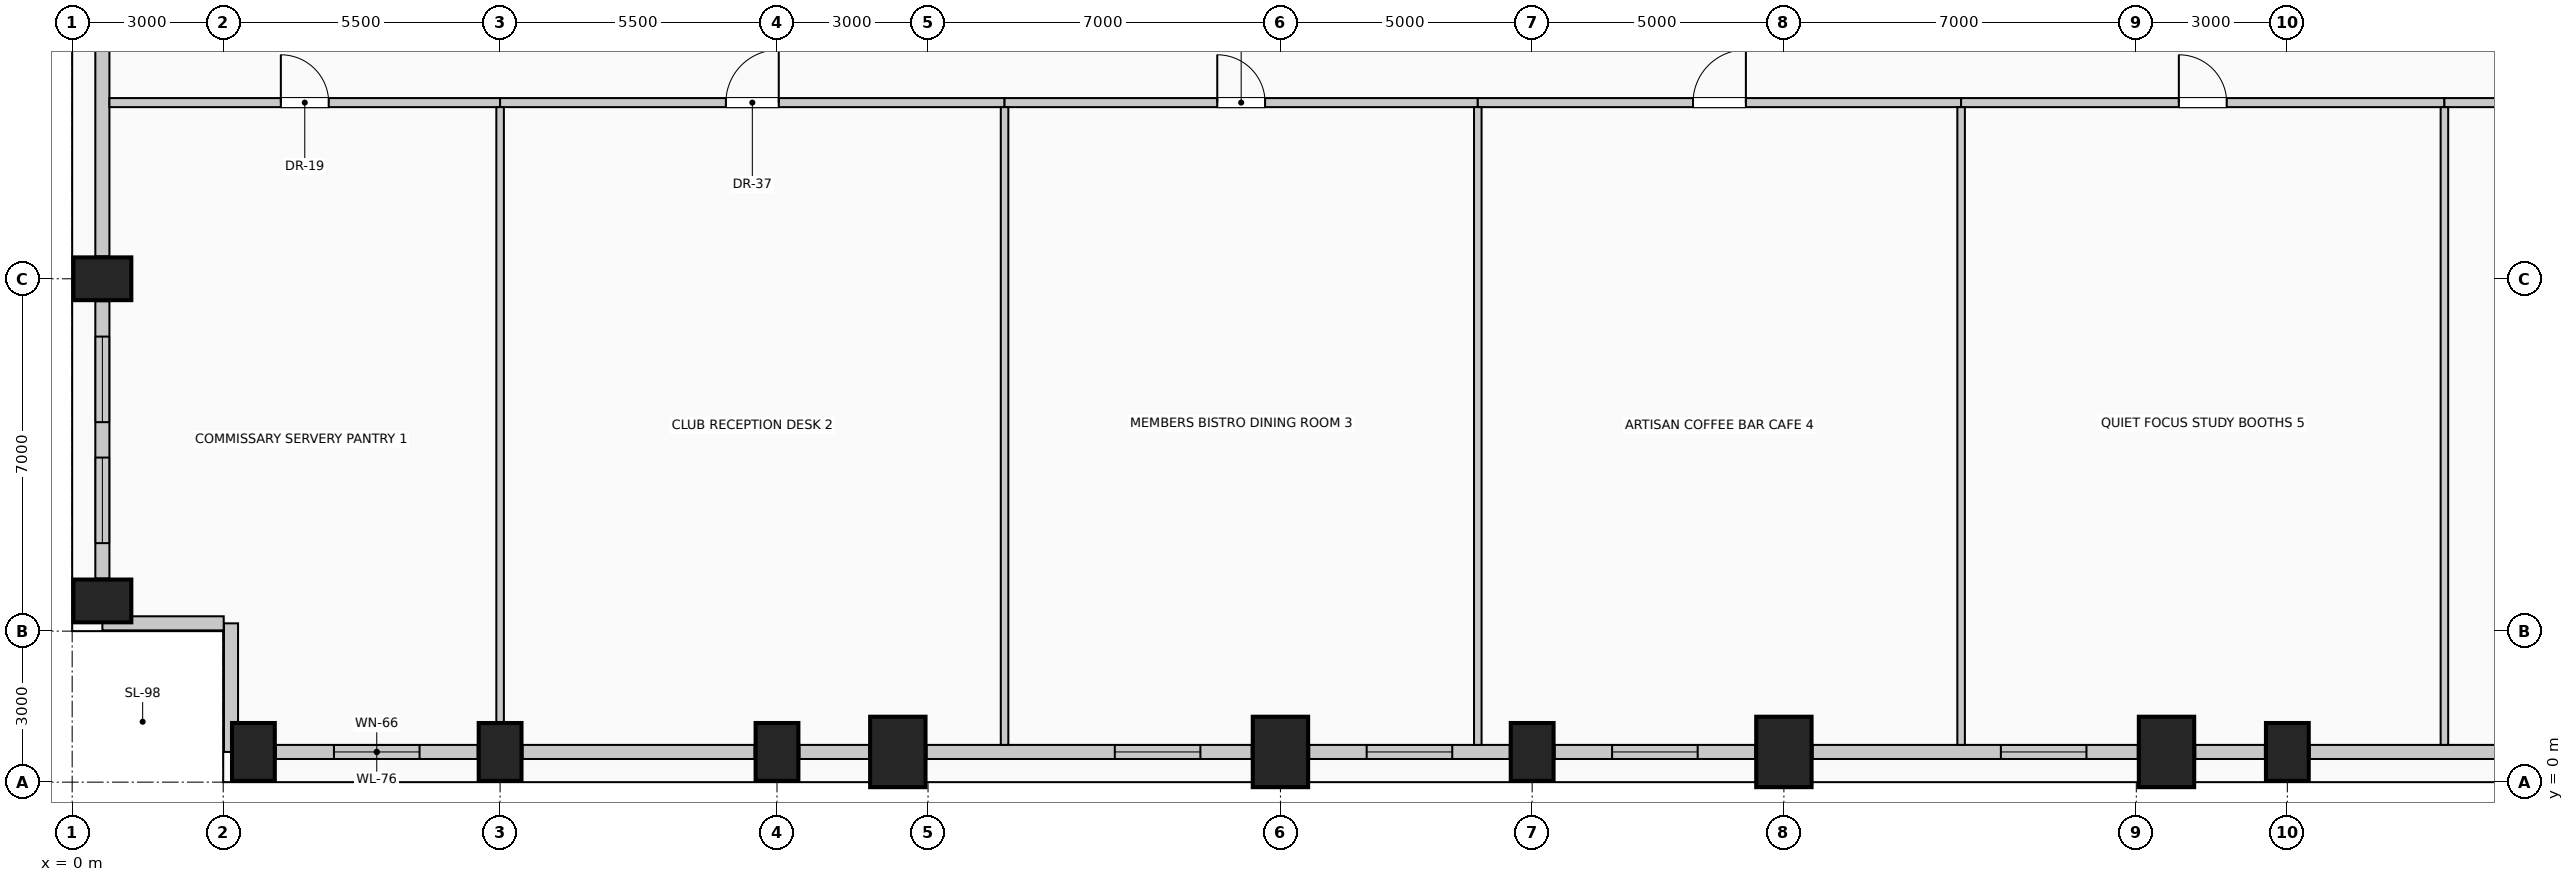
"""IFC4 building model, lengths in metres.
Left out: names, types, materials, properties, quantities, classifications, styles, units other than length and angle.
Written with IfcOpenShell. Run it as: python <this file> out.ifc"""

import sys

from ifc_helpers import new_model, si_unit, direction, frame, frame_2d, origin, origin_2d, place, context, subcontext, project, spatial, rectangle, extrude, element, fill, save


model = new_model("IFC4")
c1 = context("Model", 3, precision=1e-05, world=origin(), true_north=direction((0.0, 1.0)))
c2 = subcontext(c1, "Body", "Model", "MODEL_VIEW")
j1 = project(units=[si_unit("LENGTHUNIT", "METRE"), si_unit("PLANEANGLEUNIT", "RADIAN")], contexts=[c1])
p1 = place(None, origin())
s1 = spatial("IfcSite", under=j1, at=p1, CompositionType="ELEMENT")
p2 = place(p1, origin())
s2 = spatial("IfcBuilding", under=s1, at=p2, CompositionType="ELEMENT")
p3 = place(p2, frame((0.0, 0.0, 96.6)))
s3 = spatial("IfcBuildingStorey", under=s2, at=p3, CompositionType="ELEMENT", Elevation=96.6)
for number, where, z_axis, x_axis in (
    (1, (3.6, 0.6, 0.0), (0.0, 0.0, 1.0), (1.0, 0.0, 0.0)),
    (2, (8.5, 0.6, 0.0), (0.0, 0.0, 1.0), (1.0, 0.0, 0.0)),
    (3, (14.0, 0.6, 0.0), (0.0, 0.0, 1.0), (1.0, 0.0, 0.0)),
):
    element("IfcColumn", number, at=place(p3, frame(where, z_axis=z_axis, x_axis=x_axis)), inside=s3, PredefinedType="COLUMN", context=c2, shape_type="SweptSolid", body=[
        extrude(rectangle(XDim=0.85, YDim=1.15, at=origin_2d()), origin(), (0.0, 0.0, 1.0), 4.0),
    ])
for number, where, z_axis, x_axis in (
    (4, (16.4, 0.6, 0.0), (0.0, 0.0, 1.0), (1.0, 0.0, 0.0)),
    (5, (24.0, 0.6, 0.0), (0.0, 0.0, 1.0), (1.0, 0.0, 0.0)),
):
    element("IfcColumn", number, at=place(p3, frame(where, z_axis=z_axis, x_axis=x_axis)), inside=s3, PredefinedType="COLUMN", context=c2, shape_type="SweptSolid", body=[
        extrude(rectangle(XDim=1.1, YDim=1.4, at=origin_2d()), origin(), (0.0, 0.0, 1.0), 4.0),
    ])
p4 = place(p3, frame((29.0, 0.6, 0.0), z_axis=(0.0, 0.0, 1.0), x_axis=(1.0, 0.0, 0.0)))
e6 = element("IfcColumn", 6, at=p4, inside=s3, PredefinedType="COLUMN", context=c2, shape_type="SweptSolid", body=[
    extrude(rectangle(XDim=0.85, YDim=1.15, at=origin_2d()), origin(), (0.0, 0.0, 1.0), 4.0),
])
for number, where, z_axis, x_axis in (
    (7, (34.0, 0.6, 0.0), (0.0, 0.0, 1.0), (1.0, 0.0, 0.0)),
    (8, (41.6, 0.6, 0.0), (0.0, 0.0, 1.0), (1.0, 0.0, 0.0)),
):
    element("IfcColumn", number, at=place(p3, frame(where, z_axis=z_axis, x_axis=x_axis)), inside=s3, PredefinedType="COLUMN", context=c2, shape_type="SweptSolid", body=[
        extrude(rectangle(XDim=1.1, YDim=1.4, at=origin_2d()), origin(), (0.0, 0.0, 1.0), 4.0),
    ])
for number, where, z_axis, x_axis in (
    (9, (44.0, 0.6, 0.0), (0.0, 0.0, 1.0), (1.0, 0.0, 0.0)),
    (10, (0.6, 3.6, 0.0), (0.0, 0.0, 1.0), (0.0, 1.0, 0.0)),
    (11, (0.6, 10.0, 0.0), (0.0, 0.0, 1.0), (0.0, 1.0, 0.0)),
):
    element("IfcColumn", number, at=place(p3, frame(where, z_axis=z_axis, x_axis=x_axis)), inside=s3, PredefinedType="COLUMN", context=c2, shape_type="SweptSolid", body=[
        extrude(rectangle(XDim=0.85, YDim=1.15, at=origin_2d()), origin(), (0.0, 0.0, 1.0), 4.0),
    ])
p5 = place(p3, frame((8.055, 0.6, 0.0), z_axis=(0.0, 0.0, 1.0), x_axis=(-1.0, 0.0, 0.0)))
e12 = element("IfcWall", 12, at=p5, inside=s3, PredefinedType="SOLIDWALL", context=c2, shape_type="SweptSolid", body=[
    extrude(rectangle(XDim=4.01, YDim=0.28, at=frame_2d((2.005, 0.0))), origin(), (0.0, 0.0, 1.0), 2.875),
])
p6 = place(p5, frame((1.155, 0.0, 0.5)))
e13 = element("IfcOpeningElement", 13, at=p6, cuts=e12, PredefinedType="OPENING", context=c2, shape_type="SweptSolid", body=[
    extrude(rectangle(XDim=1.7, YDim=1.95, at=frame_2d((0.85, 0.975))), frame((0.0, 0.15, 0.0), z_axis=(0.0, -1.0, 0.0), x_axis=(1.0, 0.0, 0.0)), (0.0, 0.0, 1.0), 0.3),
])
p7 = place(p3, frame((13.555, 0.6, 0.0), z_axis=(0.0, 0.0, 1.0), x_axis=(-1.0, 0.0, 0.0)))
e14 = element("IfcWall", 14, at=p7, inside=s3, PredefinedType="SOLIDWALL", context=c2, shape_type="SweptSolid", body=[
    extrude(rectangle(XDim=4.61, YDim=0.28, at=frame_2d((2.305, 0.0))), origin(), (0.0, 0.0, 1.0), 2.875),
])
p8 = place(p3, frame((15.83, 0.6, 0.0), z_axis=(0.0, 0.0, 1.0), x_axis=(-1.0, 0.0, 0.0)))
e15 = element("IfcWall", 15, at=p8, inside=s3, PredefinedType="SOLIDWALL", context=c2, shape_type="SweptSolid", body=[
    extrude(rectangle(XDim=1.385, YDim=0.28, at=frame_2d((0.692, 0.0))), origin(), (0.0, 0.0, 1.0), 2.875),
])
p9 = place(p3, frame((23.43, 0.6, 0.0), z_axis=(0.0, 0.0, 1.0), x_axis=(-1.0, 0.0, 0.0)))
e16 = element("IfcWall", 16, at=p9, inside=s3, PredefinedType="SOLIDWALL", context=c2, shape_type="SweptSolid", body=[
    extrude(rectangle(XDim=6.46, YDim=0.28, at=frame_2d((3.23, 0.0))), origin(), (0.0, 0.0, 1.0), 2.875),
])
p10 = place(p9, frame((1.02, 0.0, 0.5)))
e17 = element("IfcOpeningElement", 17, at=p10, cuts=e16, PredefinedType="OPENING", context=c2, shape_type="SweptSolid", body=[
    extrude(rectangle(XDim=1.7, YDim=1.95, at=frame_2d((0.85, 0.975))), frame((0.0, 0.15, 0.0), z_axis=(0.0, -1.0, 0.0), x_axis=(1.0, 0.0, 0.0)), (0.0, 0.0, 1.0), 0.3),
])
p11 = place(p3, frame((28.555, 0.6, 0.0), z_axis=(0.0, 0.0, 1.0), x_axis=(-1.0, 0.0, 0.0)))
e18 = element("IfcWall", 18, at=p11, inside=s3, PredefinedType="SOLIDWALL", context=c2, shape_type="SweptSolid", body=[
    extrude(rectangle(XDim=3.985, YDim=0.28, at=frame_2d((1.992, 0.0))), origin(), (0.0, 0.0, 1.0), 2.875),
])
p12 = place(p11, frame((1.143, 0.0, 0.5)))
e19 = element("IfcOpeningElement", 19, at=p12, cuts=e18, PredefinedType="OPENING", context=c2, shape_type="SweptSolid", body=[
    extrude(rectangle(XDim=1.7, YDim=1.95, at=frame_2d((0.85, 0.975))), frame((0.0, 0.15, 0.0), z_axis=(0.0, -1.0, 0.0), x_axis=(1.0, 0.0, 0.0)), (0.0, 0.0, 1.0), 0.3),
])
p13 = place(p3, frame((33.43, 0.6, 0.0), z_axis=(0.0, 0.0, 1.0), x_axis=(-1.0, 0.0, 0.0)))
e20 = element("IfcWall", 20, at=p13, inside=s3, PredefinedType="SOLIDWALL", context=c2, shape_type="SweptSolid", body=[
    extrude(rectangle(XDim=3.985, YDim=0.28, at=frame_2d((1.992, 0.0))), origin(), (0.0, 0.0, 1.0), 2.875),
])
p14 = place(p13, frame((1.143, 0.0, 0.5)))
e21 = element("IfcOpeningElement", 21, at=p14, cuts=e20, PredefinedType="OPENING", context=c2, shape_type="SweptSolid", body=[
    extrude(rectangle(XDim=1.7, YDim=1.95, at=frame_2d((0.85, 0.975))), frame((0.0, 0.15, 0.0), z_axis=(0.0, -1.0, 0.0), x_axis=(1.0, 0.0, 0.0)), (0.0, 0.0, 1.0), 0.3),
])
p15 = place(p3, frame((41.03, 0.6, 0.0), z_axis=(0.0, 0.0, 1.0), x_axis=(-1.0, 0.0, 0.0)))
e22 = element("IfcWall", 22, at=p15, inside=s3, PredefinedType="SOLIDWALL", context=c2, shape_type="SweptSolid", body=[
    extrude(rectangle(XDim=6.46, YDim=0.28, at=frame_2d((3.23, 0.0))), origin(), (0.0, 0.0, 1.0), 2.875),
])
p16 = place(p15, frame((1.02, 0.0, 0.5)))
e23 = element("IfcOpeningElement", 23, at=p16, cuts=e22, PredefinedType="OPENING", context=c2, shape_type="SweptSolid", body=[
    extrude(rectangle(XDim=1.7, YDim=1.95, at=frame_2d((0.85, 0.975))), frame((0.0, 0.15, 0.0), z_axis=(0.0, -1.0, 0.0), x_axis=(1.0, 0.0, 0.0)), (0.0, 0.0, 1.0), 0.3),
])
p17 = place(p3, frame((43.555, 0.6, 0.0), z_axis=(0.0, 0.0, 1.0), x_axis=(-1.0, 0.0, 0.0)))
e24 = element("IfcWall", 24, at=p17, inside=s3, PredefinedType="SOLIDWALL", context=c2, shape_type="SweptSolid", body=[
    extrude(rectangle(XDim=1.385, YDim=0.28, at=frame_2d((0.692, 0.0))), origin(), (0.0, 0.0, 1.0), 2.875),
])
p18 = place(p3, frame((49.055, 0.6, 0.0), z_axis=(0.0, 0.0, 1.0), x_axis=(-1.0, 0.0, 0.0)))
e25 = element("IfcWall", 25, at=p18, inside=s3, PredefinedType="SOLIDWALL", context=c2, shape_type="SweptSolid", body=[
    extrude(rectangle(XDim=4.61, YDim=0.28, at=frame_2d((2.305, 0.0))), origin(), (0.0, 0.0, 1.0), 2.875),
])
p19 = place(p3, frame((0.6, 4.045, 0.0), z_axis=(0.0, 0.0, 1.0), x_axis=(0.0, 1.0, 0.0)))
e26 = element("IfcWall", 26, at=p19, inside=s3, PredefinedType="SOLIDWALL", context=c2, shape_type="SweptSolid", body=[
    extrude(rectangle(XDim=5.51, YDim=0.28, at=frame_2d((2.755, 0.0))), origin(), (0.0, 0.0, 1.0), 2.875),
])
p20 = place(p19, frame((0.703, 0.0, 0.5)))
e27 = element("IfcOpeningElement", 27, at=p20, cuts=e26, PredefinedType="OPENING", context=c2, shape_type="SweptSolid", body=[
    extrude(rectangle(XDim=1.7, YDim=1.95, at=frame_2d((0.85, 0.975))), frame((0.0, 0.15, 0.0), z_axis=(0.0, -1.0, 0.0), x_axis=(1.0, 0.0, 0.0)), (0.0, 0.0, 1.0), 0.3),
])
p21 = place(p19, frame((3.107, 0.0, 0.5)))
e28 = element("IfcOpeningElement", 28, at=p21, cuts=e26, PredefinedType="OPENING", context=c2, shape_type="SweptSolid", body=[
    extrude(rectangle(XDim=1.7, YDim=1.95, at=frame_2d((0.85, 0.975))), frame((0.0, 0.15, 0.0), z_axis=(0.0, -1.0, 0.0), x_axis=(1.0, 0.0, 0.0)), (0.0, 0.0, 1.0), 0.3),
])
p22 = place(p3, frame((0.6, 10.445, 0.0), z_axis=(0.0, 0.0, 1.0), x_axis=(0.0, 1.0, 0.0)))
e29 = element("IfcWall", 29, at=p22, inside=s3, PredefinedType="SOLIDWALL", context=c2, shape_type="SweptSolid", body=[
    extrude(rectangle(XDim=7.11, YDim=0.28, at=frame_2d((3.555, 0.0))), origin(), (0.0, 0.0, 1.0), 2.875),
])
p23 = place(p3, frame((3.155, 0.6, 0.0), z_axis=(0.0, 0.0, 1.0), x_axis=(0.0, 1.0, 0.0)))
e30 = element("IfcWall", 30, at=p23, inside=s3, PredefinedType="SOLIDWALL", context=c2, shape_type="SweptSolid", body=[
    extrude(rectangle(XDim=2.555, YDim=0.28, at=frame_2d((1.277, 0.0))), origin(), (0.0, 0.0, 1.0), 3.725),
])
p24 = place(p3, frame((3.01, 3.155, 0.0), z_axis=(0.0, 0.0, 1.0), x_axis=(-1.0, 0.0, 0.0)))
e31 = element("IfcWall", 31, at=p24, inside=s3, PredefinedType="SOLIDWALL", context=c2, shape_type="SweptSolid", body=[
    extrude(rectangle(XDim=2.41, YDim=0.28, at=frame_2d((1.205, 0.0))), origin(), (0.0, 0.0, 1.0), 3.725),
])
p25 = place(p3, frame((0.74, 13.5, 0.0), z_axis=(0.0, 0.0, 1.0), x_axis=(1.0, 0.0, 0.0)))
e32 = element("IfcWall", 32, at=p25, inside=s3, PredefinedType="PARTITIONING", context=c2, shape_type="SweptSolid", body=[
    extrude(rectangle(XDim=7.76, YDim=0.18, at=frame_2d((3.88, 0.0))), origin(), (0.0, 0.0, 1.0), 3.725),
])
p26 = place(p25, frame((3.405, 0.0, 0.0)))
e33 = element("IfcOpeningElement", 33, at=p26, cuts=e32, PredefinedType="OPENING", context=c2, shape_type="SweptSolid", body=[
    extrude(rectangle(XDim=0.95, YDim=2.15, at=frame_2d((0.475, 1.075))), frame((0.0, 0.1, 0.0), z_axis=(0.0, -1.0, 0.0), x_axis=(1.0, 0.0, 0.0)), (0.0, 0.0, 1.0), 0.2),
])
p27 = place(p3, frame((8.5, 13.5, 0.0), z_axis=(0.0, 0.0, 1.0), x_axis=(1.0, 0.0, 0.0)))
e34 = element("IfcWall", 34, at=p27, inside=s3, PredefinedType="PARTITIONING", context=c2, shape_type="SweptSolid", body=[
    extrude(rectangle(XDim=10.02, YDim=0.18, at=frame_2d((5.01, 0.0))), origin(), (0.0, 0.0, 1.0), 3.725),
])
p28 = place(p27, frame((4.485, 0.0, 0.0)))
e35 = element("IfcOpeningElement", 35, at=p28, cuts=e34, PredefinedType="OPENING", context=c2, shape_type="SweptSolid", body=[
    extrude(rectangle(XDim=1.05, YDim=2.15, at=frame_2d((0.525, 1.075))), frame((0.0, 0.1, 0.0), z_axis=(0.0, -1.0, 0.0), x_axis=(1.0, 0.0, 0.0)), (0.0, 0.0, 1.0), 0.2),
])
p29 = place(p3, frame((18.52, 13.5, 0.0), z_axis=(0.0, 0.0, 1.0), x_axis=(1.0, 0.0, 0.0)))
e36 = element("IfcWall", 36, at=p29, inside=s3, PredefinedType="PARTITIONING", context=c2, shape_type="SweptSolid", body=[
    extrude(rectangle(XDim=9.4, YDim=0.18, at=frame_2d((4.7, 0.0))), origin(), (0.0, 0.0, 1.0), 3.725),
])
p30 = place(p29, frame((4.225, 0.0, 0.0)))
e37 = element("IfcOpeningElement", 37, at=p30, cuts=e36, PredefinedType="OPENING", context=c2, shape_type="SweptSolid", body=[
    extrude(rectangle(XDim=0.95, YDim=2.15, at=frame_2d((0.475, 1.075))), frame((0.0, 0.1, 0.0), z_axis=(0.0, -1.0, 0.0), x_axis=(1.0, 0.0, 0.0)), (0.0, 0.0, 1.0), 0.2),
])
p31 = place(p3, frame((27.92, 13.5, 0.0), z_axis=(0.0, 0.0, 1.0), x_axis=(1.0, 0.0, 0.0)))
e38 = element("IfcWall", 38, at=p31, inside=s3, PredefinedType="PARTITIONING", context=c2, shape_type="SweptSolid", body=[
    extrude(rectangle(XDim=9.6, YDim=0.18, at=frame_2d((4.8, 0.0))), origin(), (0.0, 0.0, 1.0), 3.725),
])
p32 = place(p31, frame((4.275, 0.0, 0.0)))
e39 = element("IfcOpeningElement", 39, at=p32, cuts=e38, PredefinedType="OPENING", context=c2, shape_type="SweptSolid", body=[
    extrude(rectangle(XDim=1.05, YDim=2.15, at=frame_2d((0.525, 1.075))), frame((0.0, 0.1, 0.0), z_axis=(0.0, -1.0, 0.0), x_axis=(1.0, 0.0, 0.0)), (0.0, 0.0, 1.0), 0.2),
])
p33 = place(p3, frame((37.52, 13.5, 0.0), z_axis=(0.0, 0.0, 1.0), x_axis=(1.0, 0.0, 0.0)))
e40 = element("IfcWall", 40, at=p33, inside=s3, PredefinedType="PARTITIONING", context=c2, shape_type="SweptSolid", body=[
    extrude(rectangle(XDim=9.6, YDim=0.18, at=frame_2d((4.8, 0.0))), origin(), (0.0, 0.0, 1.0), 3.725),
])
p34 = place(p33, frame((4.325, 0.0, 0.0)))
e41 = element("IfcOpeningElement", 41, at=p34, cuts=e40, PredefinedType="OPENING", context=c2, shape_type="SweptSolid", body=[
    extrude(rectangle(XDim=0.95, YDim=2.15, at=frame_2d((0.475, 1.075))), frame((0.0, 0.1, 0.0), z_axis=(0.0, -1.0, 0.0), x_axis=(1.0, 0.0, 0.0)), (0.0, 0.0, 1.0), 0.2),
])
p35 = place(p3, frame((47.12, 13.5, 0.0), z_axis=(0.0, 0.0, 1.0), x_axis=(1.0, 0.0, 0.0)))
e42 = element("IfcWall", 42, at=p35, inside=s3, PredefinedType="PARTITIONING", context=c2, shape_type="SweptSolid", body=[
    extrude(rectangle(XDim=10.14, YDim=0.18, at=frame_2d((5.07, 0.0))), origin(), (0.0, 0.0, 1.0), 3.725),
])
p36 = place(p35, frame((4.545, 0.0, 0.0)))
e43 = element("IfcOpeningElement", 43, at=p36, cuts=e42, PredefinedType="OPENING", context=c2, shape_type="SweptSolid", body=[
    extrude(rectangle(XDim=1.05, YDim=2.15, at=frame_2d((0.525, 1.075))), frame((0.0, 0.1, 0.0), z_axis=(0.0, -1.0, 0.0), x_axis=(1.0, 0.0, 0.0)), (0.0, 0.0, 1.0), 0.2),
])
p37 = place(p3, frame((8.5, 1.175, 0.0), z_axis=(0.0, 0.0, 1.0), x_axis=(0.0, 1.0, 0.0)))
e44 = element("IfcWall", 44, at=p37, inside=s3, PredefinedType="PARTITIONING", context=c2, shape_type="SweptSolid", body=[
    extrude(rectangle(XDim=12.235, YDim=0.15, at=frame_2d((6.117, 0.0))), origin(), (0.0, 0.0, 1.0), 3.725),
])
for number, where, z_axis, x_axis in (
    (45, (18.52, 0.74, 0.0), (0.0, 0.0, 1.0), (0.0, 1.0, 0.0)),
    (46, (27.92, 0.74, 0.0), (0.0, 0.0, 1.0), (0.0, 1.0, 0.0)),
    (47, (37.52, 0.74, 0.0), (0.0, 0.0, 1.0), (0.0, 1.0, 0.0)),
    (48, (47.12, 0.74, 0.0), (0.0, 0.0, 1.0), (0.0, 1.0, 0.0)),
):
    element("IfcWall", number, at=place(p3, frame(where, z_axis=z_axis, x_axis=x_axis)), inside=s3, PredefinedType="PARTITIONING", context=c2, shape_type="SweptSolid", body=[
        extrude(rectangle(XDim=12.67, YDim=0.15, at=frame_2d((6.335, 0.0))), origin(), (0.0, 0.0, 1.0), 3.725),
    ])
p38 = place(p6, origin())
e49 = element("IfcWindow", 49, at=p38, inside=s3, PartitioningType="SINGLE_PANEL", PredefinedType="WINDOW", context=c2, shape_type="SweptSolid", body=[
    extrude(rectangle(XDim=1.7, YDim=1.95, at=frame_2d((0.85, 0.975))), frame((0.0, 0.03, 0.0), z_axis=(0.0, -1.0, 0.0), x_axis=(1.0, 0.0, 0.0)), (0.0, 0.0, 1.0), 0.06),
])
fill(e13, e49)
p39 = place(p10, origin())
e50 = element("IfcWindow", 50, at=p39, inside=s3, PartitioningType="SINGLE_PANEL", PredefinedType="WINDOW", context=c2, shape_type="SweptSolid", body=[
    extrude(rectangle(XDim=1.7, YDim=1.95, at=frame_2d((0.85, 0.975))), frame((0.0, 0.03, 0.0), z_axis=(0.0, -1.0, 0.0), x_axis=(1.0, 0.0, 0.0)), (0.0, 0.0, 1.0), 0.06),
])
fill(e17, e50)
p40 = place(p12, origin())
e51 = element("IfcWindow", 51, at=p40, inside=s3, PartitioningType="SINGLE_PANEL", PredefinedType="WINDOW", context=c2, shape_type="SweptSolid", body=[
    extrude(rectangle(XDim=1.7, YDim=1.95, at=frame_2d((0.85, 0.975))), frame((0.0, 0.03, 0.0), z_axis=(0.0, -1.0, 0.0), x_axis=(1.0, 0.0, 0.0)), (0.0, 0.0, 1.0), 0.06),
])
fill(e19, e51)
p41 = place(p14, origin())
e52 = element("IfcWindow", 52, at=p41, inside=s3, PartitioningType="SINGLE_PANEL", PredefinedType="WINDOW", context=c2, shape_type="SweptSolid", body=[
    extrude(rectangle(XDim=1.7, YDim=1.95, at=frame_2d((0.85, 0.975))), frame((0.0, 0.03, 0.0), z_axis=(0.0, -1.0, 0.0), x_axis=(1.0, 0.0, 0.0)), (0.0, 0.0, 1.0), 0.06),
])
fill(e21, e52)
p42 = place(p16, origin())
e53 = element("IfcWindow", 53, at=p42, inside=s3, PartitioningType="SINGLE_PANEL", PredefinedType="WINDOW", context=c2, shape_type="SweptSolid", body=[
    extrude(rectangle(XDim=1.7, YDim=1.95, at=frame_2d((0.85, 0.975))), frame((0.0, 0.03, 0.0), z_axis=(0.0, -1.0, 0.0), x_axis=(1.0, 0.0, 0.0)), (0.0, 0.0, 1.0), 0.06),
])
fill(e23, e53)
p43 = place(p20, origin())
e54 = element("IfcWindow", 54, at=p43, inside=s3, PartitioningType="SINGLE_PANEL", PredefinedType="WINDOW", context=c2, shape_type="SweptSolid", body=[
    extrude(rectangle(XDim=1.7, YDim=1.95, at=frame_2d((0.85, 0.975))), frame((0.0, 0.03, 0.0), z_axis=(0.0, -1.0, 0.0), x_axis=(1.0, 0.0, 0.0)), (0.0, 0.0, 1.0), 0.06),
])
fill(e27, e54)
p44 = place(p21, origin())
e55 = element("IfcWindow", 55, at=p44, inside=s3, PartitioningType="SINGLE_PANEL", PredefinedType="WINDOW", context=c2, shape_type="SweptSolid", body=[
    extrude(rectangle(XDim=1.7, YDim=1.95, at=frame_2d((0.85, 0.975))), frame((0.0, 0.03, 0.0), z_axis=(0.0, -1.0, 0.0), x_axis=(1.0, 0.0, 0.0)), (0.0, 0.0, 1.0), 0.06),
])
fill(e28, e55)
p45 = place(p26, origin())
e56 = element("IfcDoor", 56, at=p45, inside=s3, OperationType="SINGLE_SWING_LEFT", PredefinedType="DOOR", context=c2, shape_type="SweptSolid", body=[
    extrude(rectangle(XDim=0.95, YDim=2.15, at=frame_2d((0.475, 1.075))), frame((0.0, 0.025, 0.0), z_axis=(0.0, -1.0, 0.0), x_axis=(1.0, 0.0, 0.0)), (0.0, 0.0, 1.0), 0.05),
])
fill(e33, e56)
p46 = place(p28, origin())
e57 = element("IfcDoor", 57, at=p46, inside=s3, OperationType="SINGLE_SWING_RIGHT", PredefinedType="DOOR", context=c2, shape_type="SweptSolid", body=[
    extrude(rectangle(XDim=1.05, YDim=2.15, at=frame_2d((0.525, 1.075))), frame((0.0, 0.025, 0.0), z_axis=(0.0, -1.0, 0.0), x_axis=(1.0, 0.0, 0.0)), (0.0, 0.0, 1.0), 0.05),
])
fill(e35, e57)
p47 = place(p30, origin())
e58 = element("IfcDoor", 58, at=p47, inside=s3, OperationType="SINGLE_SWING_LEFT", PredefinedType="DOOR", context=c2, shape_type="SweptSolid", body=[
    extrude(rectangle(XDim=0.95, YDim=2.15, at=frame_2d((0.475, 1.075))), frame((0.0, 0.025, 0.0), z_axis=(0.0, -1.0, 0.0), x_axis=(1.0, 0.0, 0.0)), (0.0, 0.0, 1.0), 0.05),
])
fill(e37, e58)
p48 = place(p32, origin())
e59 = element("IfcDoor", 59, at=p48, inside=s3, OperationType="SINGLE_SWING_RIGHT", PredefinedType="DOOR", context=c2, shape_type="SweptSolid", body=[
    extrude(rectangle(XDim=1.05, YDim=2.15, at=frame_2d((0.525, 1.075))), frame((0.0, 0.025, 0.0), z_axis=(0.0, -1.0, 0.0), x_axis=(1.0, 0.0, 0.0)), (0.0, 0.0, 1.0), 0.05),
])
fill(e39, e59)
p49 = place(p34, origin())
e60 = element("IfcDoor", 60, at=p49, inside=s3, OperationType="SINGLE_SWING_LEFT", PredefinedType="DOOR", context=c2, shape_type="SweptSolid", body=[
    extrude(rectangle(XDim=0.95, YDim=2.15, at=frame_2d((0.475, 1.075))), frame((0.0, 0.025, 0.0), z_axis=(0.0, -1.0, 0.0), x_axis=(1.0, 0.0, 0.0)), (0.0, 0.0, 1.0), 0.05),
])
fill(e41, e60)
save(model, sys.argv[1])
